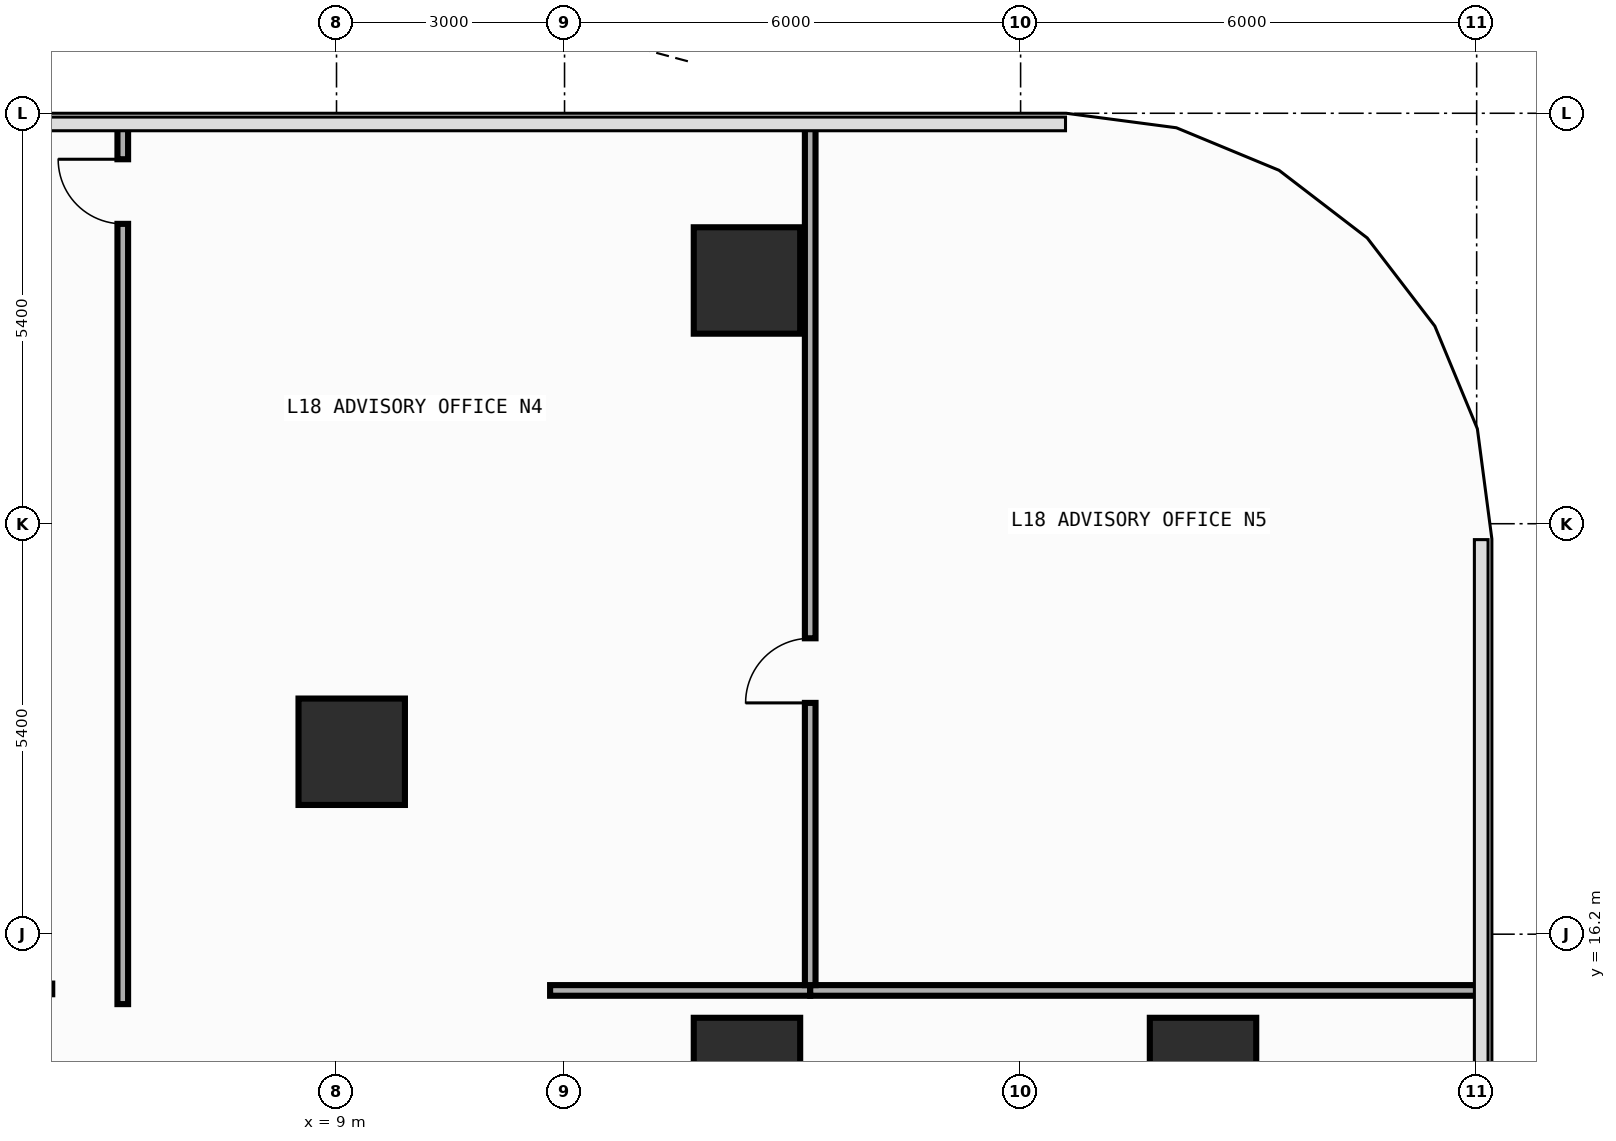
"""IFC4 building model, lengths in metres.
Left out: names, types, materials, properties, quantities, classifications, styles, units other than length and angle.
Written with IfcOpenShell. Run it as: python <this file> out.ifc"""

import sys

from ifc_helpers import new_model, si_unit, direction, frame, frame_2d, origin, origin_2d, place, context, subcontext, project, spatial, rectangle, extrude, element, fill, save


model = new_model("IFC4")
c1 = context("Model", 3, precision=1e-05, world=origin(), true_north=direction((0.0, 1.0)))
c2 = subcontext(c1, "Body", "Model", "MODEL_VIEW")
j1 = project(units=[si_unit("LENGTHUNIT", "METRE"), si_unit("PLANEANGLEUNIT", "RADIAN")], contexts=[c1])
p1 = place(None, origin())
s1 = spatial("IfcSite", under=j1, at=p1, CompositionType="ELEMENT")
p2 = place(p1, origin())
s2 = spatial("IfcBuilding", under=s1, at=p2, CompositionType="ELEMENT")
p3 = place(p2, frame((0.0, 0.0, 76.4)))
s3 = spatial("IfcBuildingStorey", under=s2, at=p3, CompositionType="ELEMENT", Elevation=76.4)
for number, where, z_axis, x_axis in (
    (1, (9.2, 18.6, 0.0), (0.0, 0.0, 1.0), (1.0, 0.0, 0.0)),
    (2, (20.4, 14.4, 0.0), (0.0, 0.0, 1.0), (1.0, 0.0, 0.0)),
    (3, (14.4, 14.4, 0.0), (0.0, 0.0, 1.0), (1.0, 0.0, 0.0)),
    (4, (14.4, 24.8, 0.0), (0.0, 0.0, 1.0), (1.0, 0.0, 0.0)),
):
    element("IfcColumn", number, at=place(p3, frame(where, z_axis=z_axis, x_axis=x_axis)), inside=s3, PredefinedType="COLUMN", context=c2, shape_type="SweptSolid", body=[
        extrude(rectangle(XDim=1.4, YDim=1.4, at=origin_2d()), origin(), (0.0, 0.0, 1.0), 4.2),
    ])
p4 = place(p3, frame((11.81, 15.46, 0.0), z_axis=(0.0, 0.0, 1.0), x_axis=(1.0, 0.0, 0.0)))
e5 = element("IfcWall", 5, at=p4, inside=s3, PredefinedType="PARTITIONING", context=c2, shape_type="SweptSolid", body=[
    extrude(rectangle(XDim=3.422, YDim=0.14, at=frame_2d((1.711, 0.0))), origin(), (0.0, 0.0, 1.0), 3.94),
])
p5 = place(p3, frame((15.232, 15.46, 0.0), z_axis=(0.0, 0.0, 1.0), x_axis=(1.0, 0.0, 0.0)))
e6 = element("IfcWall", 6, at=p5, inside=s3, PredefinedType="PARTITIONING", context=c2, shape_type="SweptSolid", body=[
    extrude(rectangle(XDim=8.823, YDim=0.14, at=frame_2d((4.412, 0.0))), origin(), (0.0, 0.0, 1.0), 3.94),
])
p6 = place(p3, frame((6.188, 15.28, 0.0), z_axis=(0.0, 0.0, 1.0), x_axis=(0.0, 1.0, 0.0)))
e7 = element("IfcWall", 7, at=p6, inside=s3, PredefinedType="PARTITIONING", context=c2, shape_type="SweptSolid", body=[
    extrude(rectangle(XDim=11.575, YDim=0.14, at=frame_2d((5.788, 0.0))), origin(), (0.0, 0.0, 1.0), 3.94),
])
p7 = place(p6, frame((10.265, 0.0, 0.0)))
e8 = element("IfcOpeningElement", 8, at=p7, cuts=e7, PredefinedType="OPENING", context=c2, shape_type="SweptSolid", body=[
    extrude(rectangle(XDim=0.85, YDim=2.1, at=frame_2d((0.425, 1.05))), frame((0.0, 0.08, 0.0), z_axis=(0.0, -1.0, 0.0), x_axis=(1.0, 0.0, 0.0)), (0.0, 0.0, 1.0), 0.16),
])
p8 = place(p3, frame((15.232, 15.53, 0.0), z_axis=(0.0, 0.0, 1.0), x_axis=(0.0, 1.0, 0.0)))
e9 = element("IfcWall", 9, at=p8, inside=s3, PredefinedType="PARTITIONING", context=c2, shape_type="SweptSolid", body=[
    extrude(rectangle(XDim=11.325, YDim=0.14, at=frame_2d((5.663, 0.0))), origin(), (0.0, 0.0, 1.0), 3.94),
])
p9 = place(p8, frame((3.713, 0.0, 0.0)))
e10 = element("IfcOpeningElement", 10, at=p9, cuts=e9, PredefinedType="OPENING", context=c2, shape_type="SweptSolid", body=[
    extrude(rectangle(XDim=0.85, YDim=2.1, at=frame_2d((0.425, 1.05))), frame((0.0, 0.08, 0.0), z_axis=(0.0, -1.0, 0.0), x_axis=(1.0, 0.0, 0.0)), (0.0, 0.0, 1.0), 0.16),
])
p10 = place(p7, origin())
e11 = element("IfcDoor", 11, at=p10, inside=s3, OperationType="SINGLE_SWING_RIGHT", PredefinedType="DOOR", context=c2, shape_type="SweptSolid", body=[
    extrude(rectangle(XDim=0.85, YDim=2.1, at=frame_2d((0.425, 1.05))), frame((0.0, 0.025, 0.0), z_axis=(0.0, -1.0, 0.0), x_axis=(1.0, 0.0, 0.0)), (0.0, 0.0, 1.0), 0.05),
])
fill(e8, e11)
p11 = place(p9, origin())
e12 = element("IfcDoor", 12, at=p11, inside=s3, OperationType="SINGLE_SWING_LEFT", PredefinedType="DOOR", context=c2, shape_type="SweptSolid", body=[
    extrude(rectangle(XDim=0.85, YDim=2.1, at=frame_2d((0.425, 1.05))), frame((0.0, 0.025, 0.0), z_axis=(0.0, -1.0, 0.0), x_axis=(1.0, 0.0, 0.0)), (0.0, 0.0, 1.0), 0.05),
])
fill(e10, e12)
save(model, sys.argv[1])
